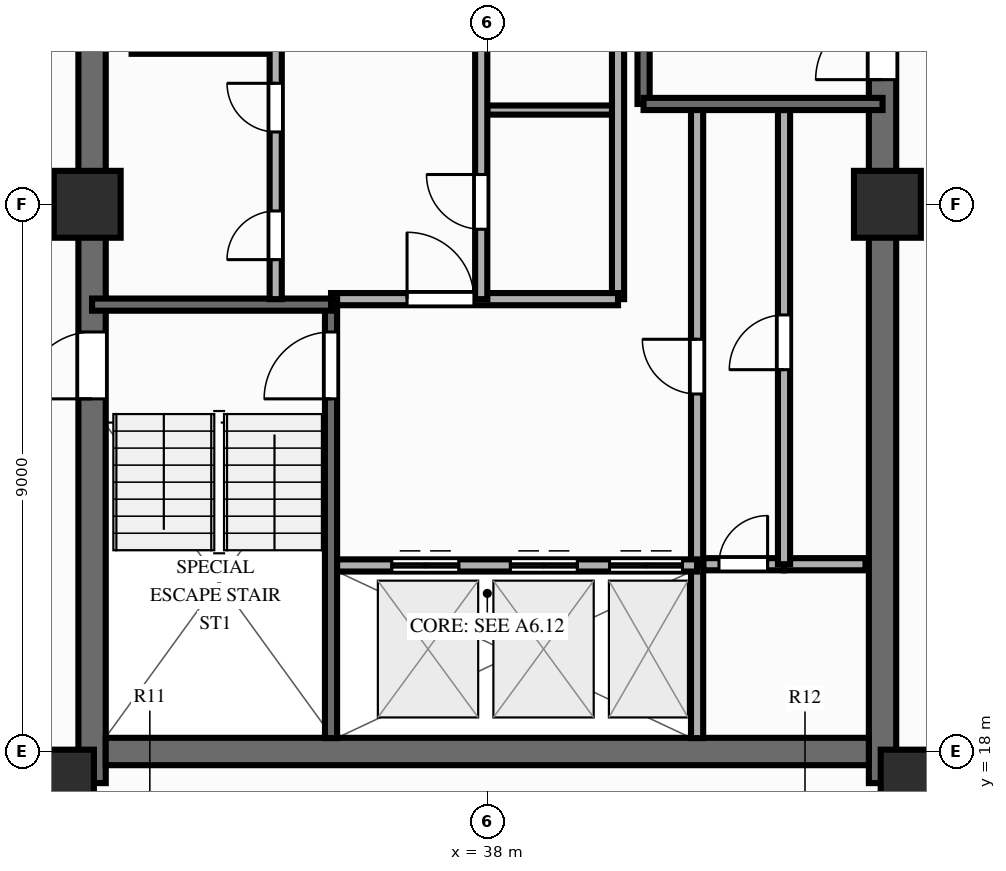
"""IFC4 building model, lengths in metres.
Left out: names, types, materials, properties, quantities, classifications, styles, units other than length and angle.
Written with IfcOpenShell. Run it as: python <this file> out.ifc"""

import sys

from ifc_helpers import new_model, si_unit, direction, frame, frame_2d, origin, origin_2d, place, context, subcontext, project, spatial, rectangle, extrude, source, transform, mapped, element, fill, save


model = new_model("IFC4")
c1 = context("Model", 3, precision=1e-05, world=origin(), true_north=direction((0.0, 1.0)))
c2 = subcontext(c1, "Body", "Model", "MODEL_VIEW")
j1 = project(units=[si_unit("LENGTHUNIT", "METRE"), si_unit("PLANEANGLEUNIT", "RADIAN")], contexts=[c1])
p1 = place(None, origin())
s1 = spatial("IfcSite", under=j1, at=p1, CompositionType="ELEMENT")
p2 = place(p1, origin())
s2 = spatial("IfcBuilding", under=s1, at=p2, CompositionType="ELEMENT")
p3 = place(p2, frame((0.0, 0.0, 179.8)))
s3 = spatial("IfcBuildingStorey", under=s2, at=p3, CompositionType="ELEMENT", Elevation=179.8)
p4 = place(p3, frame((31.5, 17.48, 0.0), z_axis=(0.0, 0.0, 1.0), x_axis=(0.0, 1.0, 0.0)))
e1 = element("IfcWall", 1, at=p4, inside=s3, PredefinedType="SHEAR", context=c2, shape_type="SweptSolid", body=[
    extrude(rectangle(XDim=19.04, YDim=0.45, at=frame_2d((9.52, 0.0))), origin(), (0.0, 0.0, 1.0), 3.0),
])
p5 = place(p4, frame((6.32, 0.0, 0.0)))
e2 = element("IfcOpeningElement", 2, at=p5, cuts=e1, PredefinedType="OPENING", context=c2, shape_type="SweptSolid", body=[
    extrude(rectangle(XDim=1.1, YDim=2.15, at=frame_2d((0.55, 1.075))), frame((0.0, 0.237, 0.0), z_axis=(0.0, -1.0, 0.0), x_axis=(1.0, 0.0, 0.0)), (0.0, 0.0, 1.0), 0.474),
])
p6 = place(p3, frame((44.5, 17.48, 0.0), z_axis=(0.0, 0.0, 1.0), x_axis=(0.0, 1.0, 0.0)))
e3 = element("IfcWall", 3, at=p6, inside=s3, PredefinedType="SHEAR", context=c2, shape_type="SweptSolid", body=[
    extrude(rectangle(XDim=19.04, YDim=0.45, at=frame_2d((9.52, 0.0))), origin(), (0.0, 0.0, 1.0), 3.0),
])
p7 = place(p6, frame((12.67, 0.0, 0.0), z_axis=(0.0, 0.0, 1.0), x_axis=(-1.0, 0.0, 0.0)))
e4 = element("IfcOpeningElement", 4, at=p7, cuts=e3, PredefinedType="OPENING", context=c2, shape_type="SweptSolid", body=[
    extrude(rectangle(XDim=1.1, YDim=2.15, at=frame_2d((0.55, 1.075))), frame((0.0, 0.237, 0.0), z_axis=(0.0, -1.0, 0.0), x_axis=(1.0, 0.0, 0.0)), (0.0, 0.0, 1.0), 0.474),
])
p8 = place(p3, frame((31.725, 18.0, 0.0), z_axis=(0.0, 0.0, 1.0), x_axis=(1.0, 0.0, 0.0)))
e5 = element("IfcWall", 5, at=p8, inside=s3, PredefinedType="SHEAR", context=c2, shape_type="SweptSolid", body=[
    extrude(rectangle(XDim=12.55, YDim=0.45, at=frame_2d((6.275, 0.0))), origin(), (0.0, 0.0, 1.0), 3.0),
])
m1 = source(origin(), c2, "Body", "SweptSolid", [
    extrude(rectangle(XDim=1.1, YDim=1.1, at=origin_2d()), origin(), (0.0, 0.0, 1.0), 3.0),
])
for number, where, z_axis, x_axis in (
    (6, (30.98, 17.48, 0.0), (0.0, 0.0, 1.0), (1.0, 0.0, 0.0)),
    (7, (45.02, 17.48, 0.0), (0.0, 0.0, 1.0), (1.0, 0.0, 0.0)),
    (8, (31.42, 27.0, 0.0), (0.0, 0.0, 1.0), (1.0, 0.0, 0.0)),
    (9, (44.58, 27.0, 0.0), (0.0, 0.0, 1.0), (1.0, 0.0, 0.0)),
):
    element("IfcColumn", number, at=place(p3, frame(where, z_axis=z_axis, x_axis=x_axis)), inside=s3, PredefinedType="COLUMN", context=c2, shape_type="MappedRepresentation", body=[
        mapped(m1, transform((0.0, 0.0, 0.0), scale=1.0)),
    ])
p9 = place(p3, frame((32.15, 29.55, 0.0), z_axis=(0.0, 0.0, 1.0), x_axis=(1.0, 0.0, 0.0)))
e10 = element("IfcWall", 10, at=p9, inside=s3, PredefinedType="PARTITIONING", context=c2, shape_type="SweptSolid", body=[
    extrude(rectangle(XDim=2.27, YDim=0.15, at=frame_2d((1.135, 0.0))), origin(), (0.0, 0.0, 1.0), 2.79),
])
p10 = place(p3, frame((38.0, 28.55, 0.0), z_axis=(0.0, 0.0, 1.0), x_axis=(1.0, 0.0, 0.0)))
e11 = element("IfcWall", 11, at=p10, inside=s3, PredefinedType="PARTITIONING", context=c2, shape_type="SweptSolid", body=[
    extrude(rectangle(XDim=2.2, YDim=0.15, at=frame_2d((1.1, 0.0))), origin(), (0.0, 0.0, 1.0), 2.14),
])
p11 = place(p3, frame((41.55, 21.08, 0.0), z_axis=(0.0, 0.0, 1.0), x_axis=(1.0, 0.0, 0.0)))
e12 = element("IfcWall", 12, at=p11, inside=s3, PredefinedType="PARTITIONING", context=c2, shape_type="SweptSolid", body=[
    extrude(rectangle(XDim=1.33, YDim=0.2, at=frame_2d((0.665, 0.0))), origin(), (0.0, 0.0, 1.0), 2.79),
])
p12 = place(p11, frame((0.26, 0.0, 0.0)))
e13 = element("IfcOpeningElement", 13, at=p12, cuts=e12, PredefinedType="OPENING", context=c2, shape_type="SweptSolid", body=[
    extrude(rectangle(XDim=0.8, YDim=2.05, at=frame_2d((0.4, 1.025))), frame((0.0, 0.112, 0.0), z_axis=(0.0, -1.0, 0.0), x_axis=(1.0, 0.0, 0.0)), (0.0, 0.0, 1.0), 0.224),
])
p13 = place(p3, frame((42.88, 21.08, 0.0), z_axis=(0.0, 0.0, 1.0), x_axis=(1.0, 0.0, 0.0)))
e14 = element("IfcWall", 14, at=p13, inside=s3, PredefinedType="PARTITIONING", context=c2, shape_type="SweptSolid", body=[
    extrude(rectangle(XDim=1.34, YDim=0.2, at=frame_2d((0.67, 0.0))), origin(), (0.0, 0.0, 1.0), 2.79),
])
p14 = place(p3, frame((42.88, 21.08, 0.0), z_axis=(0.0, 0.0, 1.0), x_axis=(0.0, 1.0, 0.0)))
e15 = element("IfcWall", 15, at=p14, inside=s3, PredefinedType="PARTITIONING", context=c2, shape_type="SweptSolid", body=[
    extrude(rectangle(XDim=7.47, YDim=0.2, at=frame_2d((3.735, 0.0))), origin(), (0.0, 0.0, 1.0), 2.79),
])
p15 = place(p14, frame((3.2, 0.0, 0.0)))
e16 = element("IfcOpeningElement", 16, at=p15, cuts=e15, PredefinedType="OPENING", context=c2, shape_type="SweptSolid", body=[
    extrude(rectangle(XDim=0.9, YDim=2.1, at=frame_2d((0.45, 1.05))), frame((0.0, 0.112, 0.0), z_axis=(0.0, -1.0, 0.0), x_axis=(1.0, 0.0, 0.0)), (0.0, 0.0, 1.0), 0.224),
])
p16 = place(p3, frame((41.45, 18.22, 0.0), z_axis=(0.0, 0.0, 1.0), x_axis=(0.0, 1.0, 0.0)))
e17 = element("IfcWall", 17, at=p16, inside=s3, PredefinedType="PARTITIONING", context=c2, shape_type="SweptSolid", body=[
    extrude(rectangle(XDim=2.86, YDim=0.2, at=frame_2d((1.43, 0.0))), origin(), (0.0, 0.0, 1.0), 2.79),
])
p17 = place(p3, frame((41.45, 21.08, 0.0), z_axis=(0.0, 0.0, 1.0), x_axis=(0.0, 1.0, 0.0)))
e18 = element("IfcWall", 18, at=p17, inside=s3, PredefinedType="PARTITIONING", context=c2, shape_type="SweptSolid", body=[
    extrude(rectangle(XDim=7.52, YDim=0.2, at=frame_2d((3.76, 0.0))), origin(), (0.0, 0.0, 1.0), 2.79),
])
p18 = place(p17, frame((2.8, 0.0, 0.0)))
e19 = element("IfcOpeningElement", 19, at=p18, cuts=e18, PredefinedType="OPENING", context=c2, shape_type="SweptSolid", body=[
    extrude(rectangle(XDim=0.9, YDim=2.1, at=frame_2d((0.45, 1.05))), frame((0.0, 0.112, 0.0), z_axis=(0.0, -1.0, 0.0), x_axis=(1.0, 0.0, 0.0)), (0.0, 0.0, 1.0), 0.224),
])
p19 = place(p3, frame((40.15, 25.44, 0.0), z_axis=(0.0, 0.0, 1.0), x_axis=(0.0, 1.0, 0.0)))
e20 = element("IfcWall", 20, at=p19, inside=s3, PredefinedType="PARTITIONING", context=c2, shape_type="SweptSolid", body=[
    extrude(rectangle(XDim=6.36, YDim=0.2, at=frame_2d((3.18, 0.0))), origin(), (0.0, 0.0, 1.0), 2.79),
])
p20 = place(p3, frame((35.43, 21.06, 0.0), z_axis=(0.0, 0.0, 1.0), x_axis=(1.0, 0.0, 0.0)))
e21 = element("IfcWall", 21, at=p20, inside=s3, PredefinedType="PARTITIONING", context=c2, shape_type="SweptSolid", body=[
    extrude(rectangle(XDim=6.02, YDim=0.2, at=frame_2d((3.01, 0.0))), origin(), (0.0, 0.0, 1.0), 2.79),
])
p21 = place(p20, frame((1.0, 0.0, 0.0)))
e22 = element("IfcOpeningElement", 22, at=p21, cuts=e21, PredefinedType="OPENING", context=c2, shape_type="SweptSolid", body=[
    extrude(rectangle(XDim=1.1, YDim=2.15, at=frame_2d((0.55, 1.075))), frame((0.0, 0.112, 0.0), z_axis=(0.0, -1.0, 0.0), x_axis=(1.0, 0.0, 0.0)), (0.0, 0.0, 1.0), 0.224),
])
p22 = place(p20, frame((2.95, 0.0, 0.0)))
e23 = element("IfcOpeningElement", 23, at=p22, cuts=e21, PredefinedType="OPENING", context=c2, shape_type="SweptSolid", body=[
    extrude(rectangle(XDim=1.1, YDim=2.15, at=frame_2d((0.55, 1.075))), frame((0.0, 0.112, 0.0), z_axis=(0.0, -1.0, 0.0), x_axis=(1.0, 0.0, 0.0)), (0.0, 0.0, 1.0), 0.224),
])
p23 = place(p20, frame((4.58, 0.0, 0.0)))
e24 = element("IfcOpeningElement", 24, at=p23, cuts=e21, PredefinedType="OPENING", context=c2, shape_type="SweptSolid", body=[
    extrude(rectangle(XDim=1.2, YDim=2.15, at=frame_2d((0.6, 1.075))), frame((0.0, 0.112, 0.0), z_axis=(0.0, -1.0, 0.0), x_axis=(1.0, 0.0, 0.0)), (0.0, 0.0, 1.0), 0.224),
])
p24 = place(p3, frame((35.43, 25.44, 0.0), z_axis=(0.0, 0.0, 1.0), x_axis=(1.0, 0.0, 0.0)))
e25 = element("IfcWall", 25, at=p24, inside=s3, PredefinedType="PARTITIONING", context=c2, shape_type="SweptSolid", body=[
    extrude(rectangle(XDim=4.72, YDim=0.2, at=frame_2d((2.36, 0.0))), origin(), (0.0, 0.0, 1.0), 2.79),
])
p25 = place(p24, frame((1.25, 0.0, 0.0)))
e26 = element("IfcOpeningElement", 26, at=p25, cuts=e25, PredefinedType="OPENING", context=c2, shape_type="SweptSolid", body=[
    extrude(rectangle(XDim=1.1, YDim=2.15, at=frame_2d((0.55, 1.075))), frame((0.0, 0.112, 0.0), z_axis=(0.0, -1.0, 0.0), x_axis=(1.0, 0.0, 0.0)), (0.0, 0.0, 1.0), 0.224),
])
p26 = place(p3, frame((35.43, 18.22, 0.0), z_axis=(0.0, 0.0, 1.0), x_axis=(0.0, 1.0, 0.0)))
e27 = element("IfcWall", 27, at=p26, inside=s3, PredefinedType="SOLIDWALL", context=c2, shape_type="SweptSolid", body=[
    extrude(rectangle(XDim=7.22, YDim=0.2, at=frame_2d((3.61, 0.0))), origin(), (0.0, 0.0, 1.0), 2.79),
])
p27 = place(p26, frame((6.68, 0.0, 0.0), z_axis=(0.0, 0.0, 1.0), x_axis=(-1.0, 0.0, 0.0)))
e28 = element("IfcOpeningElement", 28, at=p27, cuts=e27, PredefinedType="OPENING", context=c2, shape_type="SweptSolid", body=[
    extrude(rectangle(XDim=1.1, YDim=2.15, at=frame_2d((0.55, 1.075))), frame((0.0, 0.112, 0.0), z_axis=(0.0, -1.0, 0.0), x_axis=(1.0, 0.0, 0.0)), (0.0, 0.0, 1.0), 0.224),
])
p28 = place(p3, frame((31.5, 25.35, 0.0), z_axis=(0.0, 0.0, 1.0), x_axis=(1.0, 0.0, 0.0)))
e29 = element("IfcWall", 29, at=p28, inside=s3, PredefinedType="SOLIDWALL", context=c2, shape_type="SweptSolid", body=[
    extrude(rectangle(XDim=3.93, YDim=0.2, at=frame_2d((1.965, 0.0))), origin(), (0.0, 0.0, 1.0), 2.79),
])
p29 = place(p3, frame((40.57, 28.65, 0.0), z_axis=(0.0, 0.0, 1.0), x_axis=(0.0, 1.0, 0.0)))
e30 = element("IfcWall", 30, at=p29, inside=s3, PredefinedType="SOLIDWALL", context=c2, shape_type="SweptSolid", body=[
    extrude(rectangle(XDim=7.05, YDim=0.2, at=frame_2d((3.525, 0.0))), origin(), (0.0, 0.0, 1.0), 2.79),
])
p30 = place(p3, frame((40.57, 28.65, 0.0), z_axis=(0.0, 0.0, 1.0), x_axis=(1.0, 0.0, 0.0)))
e31 = element("IfcWall", 31, at=p30, inside=s3, PredefinedType="SOLIDWALL", context=c2, shape_type="SweptSolid", body=[
    extrude(rectangle(XDim=3.93, YDim=0.2, at=frame_2d((1.965, 0.0))), origin(), (0.0, 0.0, 1.0), 2.79),
])
p31 = place(p3, frame((34.52, 25.44, 0.0), z_axis=(0.0, 0.0, 1.0), x_axis=(0.0, 1.0, 0.0)))
e32 = element("IfcWall", 32, at=p31, inside=s3, PredefinedType="PARTITIONING", context=c2, shape_type="SweptSolid", body=[
    extrude(rectangle(XDim=10.34, YDim=0.2, at=frame_2d((5.17, 0.0))), origin(), (0.0, 0.0, 1.0), 2.79),
])
p32 = place(p31, frame((0.65, 0.0, 0.0)))
e33 = element("IfcOpeningElement", 33, at=p32, cuts=e32, PredefinedType="OPENING", context=c2, shape_type="SweptSolid", body=[
    extrude(rectangle(XDim=0.8, YDim=2.05, at=frame_2d((0.4, 1.025))), frame((0.0, 0.112, 0.0), z_axis=(0.0, -1.0, 0.0), x_axis=(1.0, 0.0, 0.0)), (0.0, 0.0, 1.0), 0.224),
])
p33 = place(p31, frame((2.75, 0.0, 0.0)))
e34 = element("IfcOpeningElement", 34, at=p33, cuts=e32, PredefinedType="OPENING", context=c2, shape_type="SweptSolid", body=[
    extrude(rectangle(XDim=0.8, YDim=2.05, at=frame_2d((0.4, 1.025))), frame((0.0, 0.112, 0.0), z_axis=(0.0, -1.0, 0.0), x_axis=(1.0, 0.0, 0.0)), (0.0, 0.0, 1.0), 0.224),
])
p34 = place(p31, frame((4.95, 0.0, 0.0)))
e35 = element("IfcOpeningElement", 35, at=p34, cuts=e32, PredefinedType="OPENING", context=c2, shape_type="SweptSolid", body=[
    extrude(rectangle(XDim=0.8, YDim=2.05, at=frame_2d((0.4, 1.025))), frame((0.0, 0.112, 0.0), z_axis=(0.0, -1.0, 0.0), x_axis=(1.0, 0.0, 0.0)), (0.0, 0.0, 1.0), 0.224),
])
p35 = place(p31, frame((7.01, 0.0, 0.0)))
e36 = element("IfcOpeningElement", 36, at=p35, cuts=e32, PredefinedType="OPENING", context=c2, shape_type="SweptSolid", body=[
    extrude(rectangle(XDim=1.0, YDim=2.15, at=frame_2d((0.5, 1.075))), frame((0.0, 0.112, 0.0), z_axis=(0.0, -1.0, 0.0), x_axis=(1.0, 0.0, 0.0)), (0.0, 0.0, 1.0), 0.224),
])
p36 = place(p31, frame((8.76, 0.0, 0.0)))
e37 = element("IfcOpeningElement", 37, at=p36, cuts=e32, PredefinedType="OPENING", context=c2, shape_type="SweptSolid", body=[
    extrude(rectangle(XDim=1.0, YDim=2.15, at=frame_2d((0.5, 1.075))), frame((0.0, 0.112, 0.0), z_axis=(0.0, -1.0, 0.0), x_axis=(1.0, 0.0, 0.0)), (0.0, 0.0, 1.0), 0.224),
])
p37 = place(p3, frame((37.9, 25.44, 0.0), z_axis=(0.0, 0.0, 1.0), x_axis=(0.0, 1.0, 0.0)))
e38 = element("IfcWall", 38, at=p37, inside=s3, PredefinedType="PARTITIONING", context=c2, shape_type="SweptSolid", body=[
    extrude(rectangle(XDim=10.34, YDim=0.2, at=frame_2d((5.17, 0.0))), origin(), (0.0, 0.0, 1.0), 2.79),
])
p38 = place(p37, frame((1.15, 0.0, 0.0)))
e39 = element("IfcOpeningElement", 39, at=p38, cuts=e38, PredefinedType="OPENING", context=c2, shape_type="SweptSolid", body=[
    extrude(rectangle(XDim=0.9, YDim=2.1, at=frame_2d((0.45, 1.05))), frame((0.0, 0.112, 0.0), z_axis=(0.0, -1.0, 0.0), x_axis=(1.0, 0.0, 0.0)), (0.0, 0.0, 1.0), 0.224),
])
p39 = place(p37, frame((4.2, 0.0, 0.0)))
e40 = element("IfcOpeningElement", 40, at=p39, cuts=e38, PredefinedType="OPENING", context=c2, shape_type="SweptSolid", body=[
    extrude(rectangle(XDim=0.9, YDim=2.1, at=frame_2d((0.45, 1.05))), frame((0.0, 0.112, 0.0), z_axis=(0.0, -1.0, 0.0), x_axis=(1.0, 0.0, 0.0)), (0.0, 0.0, 1.0), 0.224),
])
p40 = place(p37, frame((6.86, 0.0, 0.0)))
e41 = element("IfcOpeningElement", 41, at=p40, cuts=e38, PredefinedType="OPENING", context=c2, shape_type="SweptSolid", body=[
    extrude(rectangle(XDim=1.0, YDim=2.15, at=frame_2d((0.5, 1.075))), frame((0.0, 0.112, 0.0), z_axis=(0.0, -1.0, 0.0), x_axis=(1.0, 0.0, 0.0)), (0.0, 0.0, 1.0), 0.224),
])
p41 = place(p37, frame((8.71, 0.0, 0.0)))
e42 = element("IfcOpeningElement", 42, at=p41, cuts=e38, PredefinedType="OPENING", context=c2, shape_type="SweptSolid", body=[
    extrude(rectangle(XDim=1.0, YDim=2.15, at=frame_2d((0.5, 1.075))), frame((0.0, 0.112, 0.0), z_axis=(0.0, -1.0, 0.0), x_axis=(1.0, 0.0, 0.0)), (0.0, 0.0, 1.0), 0.224),
])
m2 = source(origin(), c2, "Body", "SweptSolid", [
    extrude(rectangle(XDim=1.1, YDim=2.15, at=frame_2d((0.55, 1.075))), frame((0.0, 0.025, 0.0), z_axis=(0.0, -1.0, 0.0), x_axis=(1.0, 0.0, 0.0)), (0.0, 0.0, 1.0), 0.05),
])
p42 = place(p5, origin())
e43 = element("IfcDoor", 43, at=p42, inside=s3, OperationType="SINGLE_SWING_LEFT", PredefinedType="DOOR", context=c2, shape_type="MappedRepresentation", body=[
    mapped(m2, transform((0.0, 0.0, 0.0), scale=1.0)),
])
fill(e2, e43)
p43 = place(p7, origin())
e44 = element("IfcDoor", 44, at=p43, inside=s3, OperationType="SINGLE_SWING_RIGHT", PredefinedType="DOOR", context=c2, shape_type="MappedRepresentation", body=[
    mapped(m2, transform((0.0, 0.0, 0.0), scale=1.0)),
])
fill(e4, e44)
m3 = source(origin(), c2, "Body", "SweptSolid", [
    extrude(rectangle(XDim=0.8, YDim=2.05, at=frame_2d((0.4, 1.025))), frame((0.0, 0.025, 0.0), z_axis=(0.0, -1.0, 0.0), x_axis=(1.0, 0.0, 0.0)), (0.0, 0.0, 1.0), 0.05),
])
p44 = place(p12, origin())
e45 = element("IfcDoor", 45, at=p44, inside=s3, OperationType="SINGLE_SWING_RIGHT", PredefinedType="DOOR", context=c2, shape_type="MappedRepresentation", body=[
    mapped(m3, transform((0.0, 0.0, 0.0), scale=1.0)),
])
fill(e13, e45)
m4 = source(origin(), c2, "Body", "SweptSolid", [
    extrude(rectangle(XDim=0.9, YDim=2.1, at=frame_2d((0.45, 1.05))), frame((0.0, 0.025, 0.0), z_axis=(0.0, -1.0, 0.0), x_axis=(1.0, 0.0, 0.0)), (0.0, 0.0, 1.0), 0.05),
])
p45 = place(p15, origin())
e46 = element("IfcDoor", 46, at=p45, inside=s3, OperationType="SINGLE_SWING_LEFT", PredefinedType="DOOR", context=c2, shape_type="MappedRepresentation", body=[
    mapped(m4, transform((0.0, 0.0, 0.0), scale=1.0)),
])
fill(e16, e46)
p46 = place(p18, origin())
e47 = element("IfcDoor", 47, at=p46, inside=s3, OperationType="SINGLE_SWING_RIGHT", PredefinedType="DOOR", context=c2, shape_type="MappedRepresentation", body=[
    mapped(m4, transform((0.0, 0.0, 0.0), scale=1.0)),
])
fill(e19, e47)
p47 = place(p21, origin())
e48 = element("IfcDoor", 48, at=p47, inside=s3, OperationType="DOUBLE_DOOR_SLIDING", PredefinedType="DOOR", context=c2, shape_type="MappedRepresentation", body=[
    mapped(m2, transform((0.0, 0.0, 0.0), scale=1.0)),
])
fill(e22, e48)
p48 = place(p22, origin())
e49 = element("IfcDoor", 49, at=p48, inside=s3, OperationType="DOUBLE_DOOR_SLIDING", PredefinedType="DOOR", context=c2, shape_type="MappedRepresentation", body=[
    mapped(m2, transform((0.0, 0.0, 0.0), scale=1.0)),
])
fill(e23, e49)
m5 = source(origin(), c2, "Body", "SweptSolid", [
    extrude(rectangle(XDim=1.2, YDim=2.15, at=frame_2d((0.6, 1.075))), frame((0.0, 0.025, 0.0), z_axis=(0.0, -1.0, 0.0), x_axis=(1.0, 0.0, 0.0)), (0.0, 0.0, 1.0), 0.05),
])
p49 = place(p23, origin())
e50 = element("IfcDoor", 50, at=p49, inside=s3, OperationType="DOUBLE_DOOR_SLIDING", PredefinedType="DOOR", context=c2, shape_type="MappedRepresentation", body=[
    mapped(m5, transform((0.0, 0.0, 0.0), scale=1.0)),
])
fill(e24, e50)
p50 = place(p25, origin())
e51 = element("IfcDoor", 51, at=p50, inside=s3, OperationType="SINGLE_SWING_LEFT", PredefinedType="DOOR", context=c2, shape_type="MappedRepresentation", body=[
    mapped(m2, transform((0.0, 0.0, 0.0), scale=1.0)),
])
fill(e26, e51)
p51 = place(p27, origin())
e52 = element("IfcDoor", 52, at=p51, inside=s3, OperationType="SINGLE_SWING_RIGHT", PredefinedType="DOOR", context=c2, shape_type="MappedRepresentation", body=[
    mapped(m2, transform((0.0, 0.0, 0.0), scale=1.0)),
])
fill(e28, e52)
p52 = place(p32, origin())
e53 = element("IfcDoor", 53, at=p52, inside=s3, OperationType="SINGLE_SWING_LEFT", PredefinedType="DOOR", context=c2, shape_type="MappedRepresentation", body=[
    mapped(m3, transform((0.0, 0.0, 0.0), scale=1.0)),
])
fill(e33, e53)
p53 = place(p33, origin())
e54 = element("IfcDoor", 54, at=p53, inside=s3, OperationType="SINGLE_SWING_RIGHT", PredefinedType="DOOR", context=c2, shape_type="MappedRepresentation", body=[
    mapped(m3, transform((0.0, 0.0, 0.0), scale=1.0)),
])
fill(e34, e54)
p54 = place(p38, origin())
e55 = element("IfcDoor", 55, at=p54, inside=s3, OperationType="SINGLE_SWING_RIGHT", PredefinedType="DOOR", context=c2, shape_type="MappedRepresentation", body=[
    mapped(m4, transform((0.0, 0.0, 0.0), scale=1.0)),
])
fill(e39, e55)
save(model, sys.argv[1])
